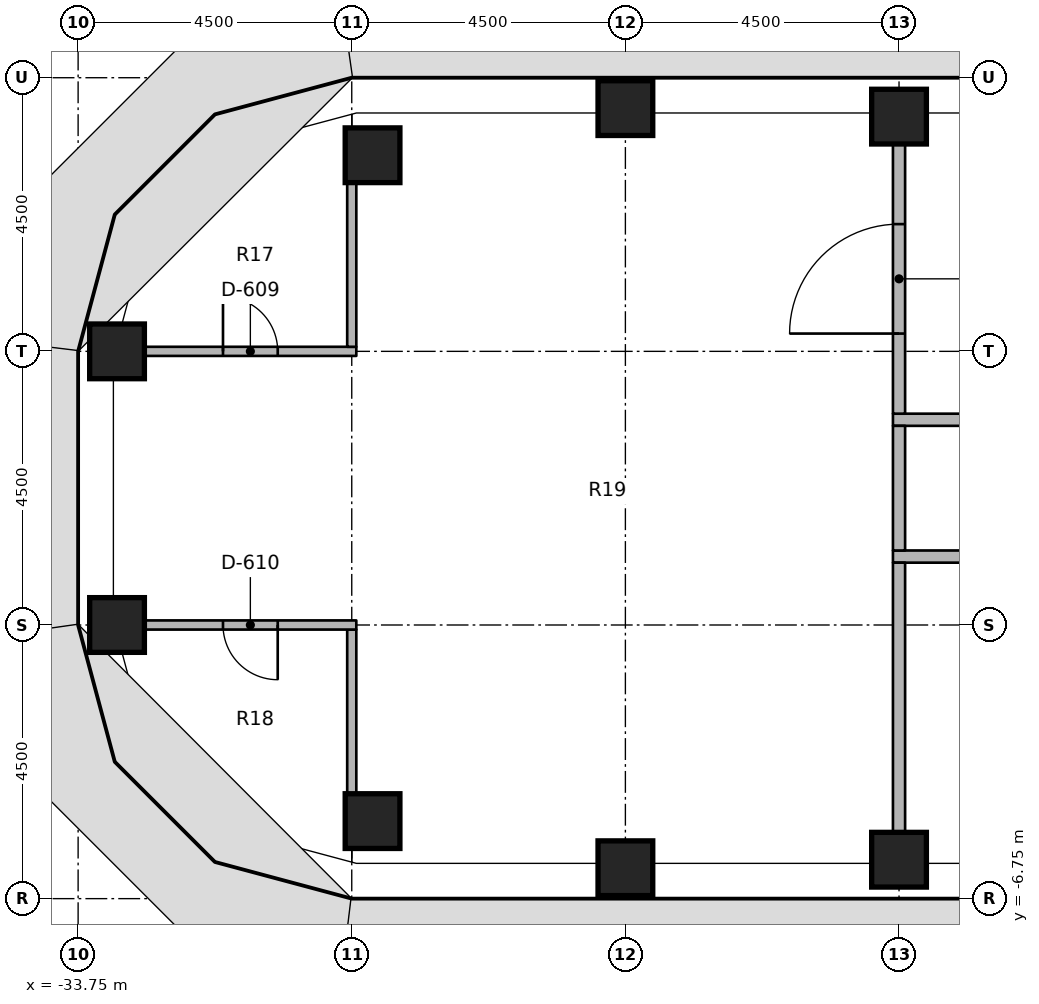
"""IFC4 building model, lengths in metres.
Left out: names, types, materials, properties, quantities, classifications, styles, units other than length and angle.
Written with IfcOpenShell. Run it as: python <this file> out.ifc"""

import sys

from ifc_helpers import new_model, si_unit, direction, frame, frame_2d, origin, origin_2d, place, context, subcontext, project, spatial, rectangle, extrude, element, fill, save


model = new_model("IFC4")
c1 = context("Model", 3, precision=1e-05, world=origin(), true_north=direction((0.0, 1.0)))
c2 = subcontext(c1, "Body", "Model", "MODEL_VIEW")
j1 = project(units=[si_unit("LENGTHUNIT", "METRE"), si_unit("PLANEANGLEUNIT", "RADIAN")], contexts=[c1])
p1 = place(None, origin())
s1 = spatial("IfcSite", under=j1, at=p1, CompositionType="ELEMENT")
p2 = place(p1, origin())
s2 = spatial("IfcBuilding", under=s1, at=p2, CompositionType="ELEMENT")
p3 = place(p2, frame((0.0, 0.0, 86.6)))
s3 = spatial("IfcBuildingStorey", under=s2, at=p3, CompositionType="ELEMENT", Elevation=86.6)
for number, where, z_axis, x_axis in (
    (1, (-33.11, -2.25, 0.0), (0.0, 0.0, 1.0), (1.0, 0.0, 0.0)),
    (2, (-33.11, 2.25, 0.0), (0.0, 0.0, 1.0), (1.0, 0.0, 0.0)),
    (3, (-28.908, -5.475, 0.0), (0.0, 0.0, 1.0), (1.0, 0.0, 0.0)),
    (4, (-28.908, 5.475, 0.0), (0.0, 0.0, 1.0), (1.0, 0.0, 0.0)),
    (5, (-24.75, -6.25, 0.0), (0.0, 0.0, 1.0), (1.0, 0.0, 0.0)),
    (6, (-24.75, 6.25, 0.0), (0.0, 0.0, 1.0), (1.0, 0.0, 0.0)),
    (7, (-20.25, -6.11, 0.0), (0.0, 0.0, 1.0), (1.0, 0.0, 0.0)),
    (8, (-20.25, 6.11, 0.0), (0.0, 0.0, 1.0), (1.0, 0.0, 0.0)),
):
    element("IfcColumn", number, at=place(p3, frame(where, z_axis=z_axis, x_axis=x_axis)), inside=s3, PredefinedType="COLUMN", context=c2, shape_type="SweptSolid", body=[
        extrude(rectangle(XDim=0.9, YDim=0.9, at=origin_2d()), origin(), (0.0, 0.0, 1.0), 3.65),
    ])
p4 = place(p3, frame((-20.35, 1.125, 0.0), z_axis=(0.0, 0.0, 1.0), x_axis=(1.0, 0.0, 0.0)))
e9 = element("IfcWall", 9, at=p4, inside=s3, PredefinedType="PARTITIONING", context=c2, shape_type="SweptSolid", body=[
    extrude(rectangle(XDim=4.7, YDim=0.2, at=frame_2d((2.35, 0.0))), origin(), (0.0, 0.0, 1.0), 2.738),
])
p5 = place(p4, frame((1.85, 0.0, 0.0)))
e10 = element("IfcOpeningElement", 10, at=p5, cuts=e9, PredefinedType="OPENING", context=c2, shape_type="SweptSolid", body=[
    extrude(rectangle(XDim=1.0, YDim=2.1, at=frame_2d((0.5, 1.05))), frame((0.0, 0.11, 0.0), z_axis=(0.0, -1.0, 0.0), x_axis=(1.0, 0.0, 0.0)), (0.0, 0.0, 1.0), 0.22),
])
p6 = place(p3, frame((-15.65, -1.125, 0.0), z_axis=(0.0, 0.0, 1.0), x_axis=(-1.0, 0.0, 0.0)))
e11 = element("IfcWall", 11, at=p6, inside=s3, PredefinedType="PARTITIONING", context=c2, shape_type="SweptSolid", body=[
    extrude(rectangle(XDim=4.7, YDim=0.2, at=frame_2d((2.35, 0.0))), origin(), (0.0, 0.0, 1.0), 2.738),
])
p7 = place(p6, frame((1.85, 0.0, 0.0)))
e12 = element("IfcOpeningElement", 12, at=p7, cuts=e11, PredefinedType="OPENING", context=c2, shape_type="SweptSolid", body=[
    extrude(rectangle(XDim=1.0, YDim=2.1, at=frame_2d((0.5, 1.05))), frame((0.0, 0.11, 0.0), z_axis=(0.0, -1.0, 0.0), x_axis=(1.0, 0.0, 0.0)), (0.0, 0.0, 1.0), 0.22),
])
p8 = place(p3, frame((-20.25, -1.025, 0.0), z_axis=(0.0, 0.0, 1.0), x_axis=(0.0, 1.0, 0.0)))
e13 = element("IfcWall", 13, at=p8, inside=s3, PredefinedType="PARTITIONING", context=c2, shape_type="SweptSolid", body=[
    extrude(rectangle(XDim=2.05, YDim=0.2, at=frame_2d((1.025, 0.0))), origin(), (0.0, 0.0, 1.0), 2.738),
])
p9 = place(p3, frame((-20.25, 1.225, 0.0), z_axis=(0.0, 0.0, 1.0), x_axis=(0.0, 1.0, 0.0)))
e14 = element("IfcWall", 14, at=p9, inside=s3, PredefinedType="PARTITIONING", context=c2, shape_type="SweptSolid", body=[
    extrude(rectangle(XDim=4.435, YDim=0.2, at=frame_2d((2.217, 0.0))), origin(), (0.0, 0.0, 1.0), 2.738),
])
p10 = place(p9, frame((1.317, 0.0, 0.0)))
e15 = element("IfcOpeningElement", 15, at=p10, cuts=e14, PredefinedType="OPENING", context=c2, shape_type="SweptSolid", body=[
    extrude(rectangle(XDim=1.8, YDim=2.1, at=frame_2d((0.9, 1.05))), frame((0.0, 0.11, 0.0), z_axis=(0.0, -1.0, 0.0), x_axis=(1.0, 0.0, 0.0)), (0.0, 0.0, 1.0), 0.22),
])
p11 = place(p3, frame((-20.25, -5.66, 0.0), z_axis=(0.0, 0.0, 1.0), x_axis=(0.0, 1.0, 0.0)))
e16 = element("IfcWall", 16, at=p11, inside=s3, PredefinedType="PARTITIONING", context=c2, shape_type="SweptSolid", body=[
    extrude(rectangle(XDim=4.435, YDim=0.2, at=frame_2d((2.217, 0.0))), origin(), (0.0, 0.0, 1.0), 2.738),
])
p12 = place(p3, frame((-32.66, 2.25, 0.0), z_axis=(0.0, 0.0, 1.0), x_axis=(1.0, 0.0, 0.0)))
e17 = element("IfcWall", 17, at=p12, inside=s3, PredefinedType="PARTITIONING", context=c2, shape_type="SweptSolid", body=[
    extrude(rectangle(XDim=3.485, YDim=0.15, at=frame_2d((1.742, 0.0))), origin(), (0.0, 0.0, 1.0), 2.738),
])
p13 = place(p12, frame((1.292, 0.0, 0.0)))
e18 = element("IfcOpeningElement", 18, at=p13, cuts=e17, PredefinedType="OPENING", context=c2, shape_type="SweptSolid", body=[
    extrude(rectangle(XDim=0.9, YDim=2.1, at=frame_2d((0.45, 1.05))), frame((0.0, 0.085, 0.0), z_axis=(0.0, -1.0, 0.0), x_axis=(1.0, 0.0, 0.0)), (0.0, 0.0, 1.0), 0.17),
])
for number, where, z_axis, x_axis in (
    (19, (-29.25, 2.325, 0.0), (0.0, 0.0, 1.0), (0.0, 1.0, 0.0)),
    (20, (-29.25, -5.025, 0.0), (0.0, 0.0, 1.0), (0.0, 1.0, 0.0)),
):
    element("IfcWall", number, at=place(p3, frame(where, z_axis=z_axis, x_axis=x_axis)), inside=s3, PredefinedType="PARTITIONING", context=c2, shape_type="SweptSolid", body=[
        extrude(rectangle(XDim=2.7, YDim=0.15, at=frame_2d((1.35, 0.0))), origin(), (0.0, 0.0, 1.0), 2.738),
    ])
p14 = place(p3, frame((-29.175, -2.25, 0.0), z_axis=(0.0, 0.0, 1.0), x_axis=(-1.0, 0.0, 0.0)))
e21 = element("IfcWall", 21, at=p14, inside=s3, PredefinedType="PARTITIONING", context=c2, shape_type="SweptSolid", body=[
    extrude(rectangle(XDim=3.485, YDim=0.15, at=frame_2d((1.742, 0.0))), origin(), (0.0, 0.0, 1.0), 2.738),
])
p15 = place(p14, frame((1.292, 0.0, 0.0)))
e22 = element("IfcOpeningElement", 22, at=p15, cuts=e21, PredefinedType="OPENING", context=c2, shape_type="SweptSolid", body=[
    extrude(rectangle(XDim=0.9, YDim=2.1, at=frame_2d((0.45, 1.05))), frame((0.0, 0.085, 0.0), z_axis=(0.0, -1.0, 0.0), x_axis=(1.0, 0.0, 0.0)), (0.0, 0.0, 1.0), 0.17),
])
p16 = place(p13, origin())
e23 = element("IfcDoor", 23, at=p16, inside=s3, OperationType="SINGLE_SWING_RIGHT", PredefinedType="DOOR", context=c2, shape_type="SweptSolid", body=[
    extrude(rectangle(XDim=0.9, YDim=2.1, at=frame_2d((0.45, 1.05))), frame((0.0, 0.025, 0.0), z_axis=(0.0, -1.0, 0.0), x_axis=(1.0, 0.0, 0.0)), (0.0, 0.0, 1.0), 0.05),
])
fill(e18, e23)
p17 = place(p15, origin())
e24 = element("IfcDoor", 24, at=p17, inside=s3, OperationType="SINGLE_SWING_LEFT", PredefinedType="DOOR", context=c2, shape_type="SweptSolid", body=[
    extrude(rectangle(XDim=0.9, YDim=2.1, at=frame_2d((0.45, 1.05))), frame((0.0, 0.025, 0.0), z_axis=(0.0, -1.0, 0.0), x_axis=(1.0, 0.0, 0.0)), (0.0, 0.0, 1.0), 0.05),
])
fill(e22, e24)
p18 = place(p10, origin())
e25 = element("IfcDoor", 25, at=p18, inside=s3, OperationType="DOUBLE_DOOR_SINGLE_SWING", PredefinedType="DOOR", context=c2, shape_type="SweptSolid", body=[
    extrude(rectangle(XDim=1.8, YDim=2.1, at=frame_2d((0.9, 1.05))), frame((0.0, 0.025, 0.0), z_axis=(0.0, -1.0, 0.0), x_axis=(1.0, 0.0, 0.0)), (0.0, 0.0, 1.0), 0.05),
])
fill(e15, e25)
save(model, sys.argv[1])
